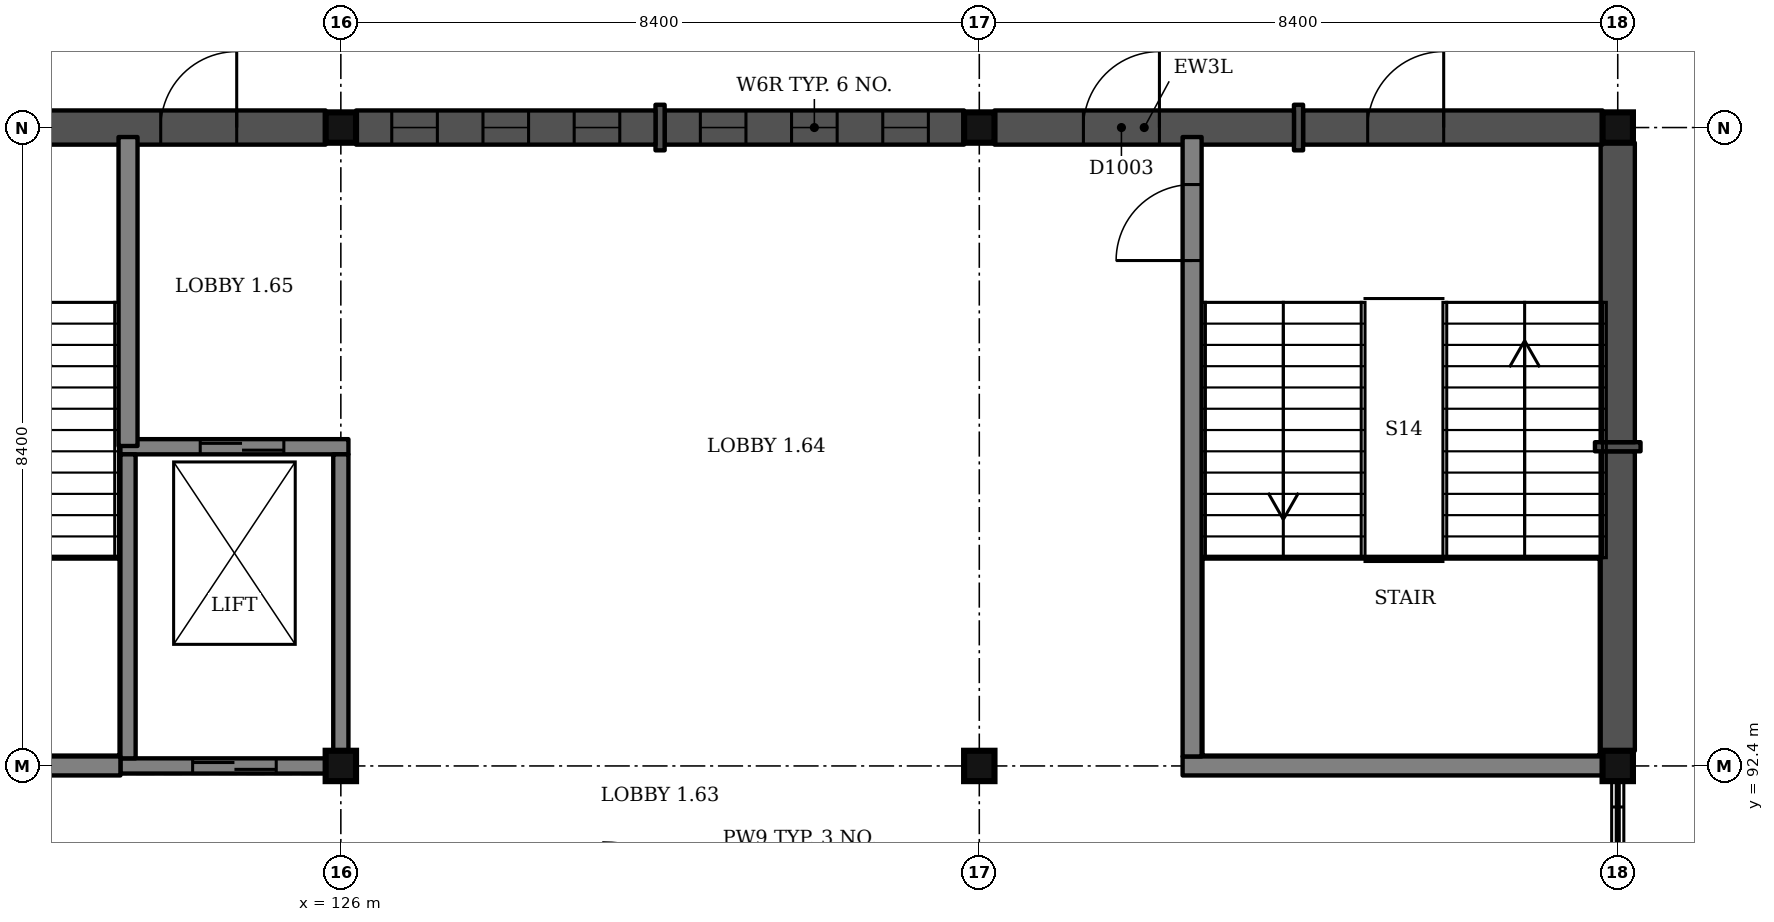
"""IFC4 building model, lengths in metres.
Left out: names, types, materials, properties, quantities, classifications, styles, units other than length and angle.
Written with IfcOpenShell. Run it as: python <this file> out.ifc"""

import sys

from ifc_helpers import new_model, si_unit, direction, frame, frame_2d, origin, origin_2d, place, context, subcontext, project, spatial, rectangle, extrude, element, fill, save


model = new_model("IFC4")
c1 = context("Model", 3, precision=1e-05, world=origin(), true_north=direction((0.0, 1.0)))
c2 = subcontext(c1, "Body", "Model", "MODEL_VIEW")
j1 = project(units=[si_unit("LENGTHUNIT", "METRE"), si_unit("PLANEANGLEUNIT", "RADIAN")], contexts=[c1])
p1 = place(None, origin())
s1 = spatial("IfcSite", under=j1, at=p1, CompositionType="ELEMENT")
p2 = place(p1, origin())
s2 = spatial("IfcBuilding", under=s1, at=p2, CompositionType="ELEMENT")
p3 = place(p2, frame((0.0, 0.0, 4.5)))
s3 = spatial("IfcBuildingStorey", under=s2, at=p3, CompositionType="ELEMENT", Elevation=4.5)
for number, where, z_axis, x_axis in (
    (1, (126.0, 92.4, -1.5), (0.0, 0.0, 1.0), (1.0, 0.0, 0.0)),
    (2, (126.0, 100.8, -1.5), (0.0, 0.0, 1.0), (1.0, 0.0, 0.0)),
    (3, (134.4, 92.4, -1.5), (0.0, 0.0, 1.0), (1.0, 0.0, 0.0)),
    (4, (134.4, 100.8, -1.5), (0.0, 0.0, 1.0), (1.0, 0.0, 0.0)),
    (5, (142.8, 92.4, -1.5), (0.0, 0.0, 1.0), (1.0, 0.0, 0.0)),
    (6, (142.8, 100.8, -1.5), (0.0, 0.0, 1.0), (1.0, 0.0, 0.0)),
):
    element("IfcColumn", number, at=place(p3, frame(where, z_axis=z_axis, x_axis=x_axis)), inside=s3, PredefinedType="COLUMN", context=c2, shape_type="SweptSolid", body=[
        extrude(rectangle(XDim=0.4, YDim=0.4, at=origin_2d()), origin(), (0.0, 0.0, 1.0), 6.0),
    ])
p4 = place(p3, frame((123.1, 92.4, 0.0), z_axis=(0.0, 0.0, 1.0), x_axis=(1.0, 0.0, 0.0)))
e7 = element("IfcWall", 7, at=p4, inside=s3, PredefinedType="SHEAR", context=c2, shape_type="SweptSolid", body=[
    extrude(rectangle(XDim=2.7, YDim=0.2, at=frame_2d((1.35, 0.0))), origin(), (0.0, 0.0, 1.0), 4.5),
])
p5 = place(p4, frame((0.95, 0.0, 0.0)))
e8 = element("IfcOpeningElement", 8, at=p5, cuts=e7, PredefinedType="OPENING", context=c2, shape_type="SweptSolid", body=[
    extrude(rectangle(XDim=1.1, YDim=2.1, at=frame_2d((0.55, 1.05))), frame((0.0, 0.11, 0.0), z_axis=(0.0, -1.0, 0.0), x_axis=(1.0, 0.0, 0.0)), (0.0, 0.0, 1.0), 0.22),
])
p6 = place(p3, frame((123.1, 96.6, 0.0), z_axis=(0.0, 0.0, 1.0), x_axis=(1.0, 0.0, 0.0)))
e9 = element("IfcWall", 9, at=p6, inside=s3, PredefinedType="SHEAR", context=c2, shape_type="SweptSolid", body=[
    extrude(rectangle(XDim=3.0, YDim=0.2, at=frame_2d((1.5, 0.0))), origin(), (0.0, 0.0, 1.0), 4.5),
])
p7 = place(p6, frame((1.05, 0.0, 0.0)))
e10 = element("IfcOpeningElement", 10, at=p7, cuts=e9, PredefinedType="OPENING", context=c2, shape_type="SweptSolid", body=[
    extrude(rectangle(XDim=1.1, YDim=2.1, at=frame_2d((0.55, 1.05))), frame((0.0, 0.11, 0.0), z_axis=(0.0, -1.0, 0.0), x_axis=(1.0, 0.0, 0.0)), (0.0, 0.0, 1.0), 0.22),
])
p8 = place(p3, frame((123.2, 92.5, 0.0), z_axis=(0.0, 0.0, 1.0), x_axis=(0.0, 1.0, 0.0)))
e11 = element("IfcWall", 11, at=p8, inside=s3, PredefinedType="SHEAR", context=c2, shape_type="SweptSolid", body=[
    extrude(rectangle(XDim=4.0, YDim=0.2, at=frame_2d((2.0, 0.0))), origin(), (0.0, 0.0, 1.0), 4.5),
])
p9 = place(p3, frame((126.0, 92.6, 0.0), z_axis=(0.0, 0.0, 1.0), x_axis=(0.0, 1.0, 0.0)))
e12 = element("IfcWall", 12, at=p9, inside=s3, PredefinedType="SHEAR", context=c2, shape_type="SweptSolid", body=[
    extrude(rectangle(XDim=3.9, YDim=0.2, at=frame_2d((1.95, 0.0))), origin(), (0.0, 0.0, 1.0), 4.5),
])
p10 = place(p3, frame((117.8, 92.4, 0.0), z_axis=(0.0, 0.0, 1.0), x_axis=(1.0, 0.0, 0.0)))
e13 = element("IfcWall", 13, at=p10, inside=s3, PredefinedType="SHEAR", context=c2, shape_type="SweptSolid", body=[
    extrude(rectangle(XDim=5.3, YDim=0.25, at=frame_2d((2.65, 0.0))), origin(), (0.0, 0.0, 1.0), 4.5),
])
p11 = place(p3, frame((123.2, 96.61, 0.0), z_axis=(0.0, 0.0, 1.0), x_axis=(0.0, 1.0, 0.0)))
e14 = element("IfcWall", 14, at=p11, inside=s3, PredefinedType="SHEAR", context=c2, shape_type="SweptSolid", body=[
    extrude(rectangle(XDim=4.065, YDim=0.25, at=frame_2d((2.032, 0.0))), origin(), (0.0, 0.0, 1.0), 4.5),
])
p12 = place(p3, frame((137.075, 92.4, 0.0), z_axis=(0.0, 0.0, 1.0), x_axis=(1.0, 0.0, 0.0)))
e15 = element("IfcWall", 15, at=p12, inside=s3, PredefinedType="SHEAR", context=c2, shape_type="SweptSolid", body=[
    extrude(rectangle(XDim=5.525, YDim=0.25, at=frame_2d((2.763, 0.0))), origin(), (0.0, 0.0, 1.0), 4.5),
])
p13 = place(p3, frame((137.2, 92.525, 0.0), z_axis=(0.0, 0.0, 1.0), x_axis=(0.0, 1.0, 0.0)))
e16 = element("IfcWall", 16, at=p13, inside=s3, PredefinedType="SHEAR", context=c2, shape_type="SweptSolid", body=[
    extrude(rectangle(XDim=8.15, YDim=0.25, at=frame_2d((4.075, 0.0))), origin(), (0.0, 0.0, 1.0), 4.5),
])
p14 = place(p13, frame((6.525, 0.0, 0.0)))
e17 = element("IfcOpeningElement", 17, at=p14, cuts=e16, PredefinedType="OPENING", context=c2, shape_type="SweptSolid", body=[
    extrude(rectangle(XDim=1.0, YDim=2.1, at=frame_2d((0.5, 1.05))), frame((0.0, 0.135, 0.0), z_axis=(0.0, -1.0, 0.0), x_axis=(1.0, 0.0, 0.0)), (0.0, 0.0, 1.0), 0.27),
])
p15 = place(p3, frame((142.8, 92.6, 0.0), z_axis=(0.0, 0.0, 1.0), x_axis=(0.0, 1.0, 0.0)))
e18 = element("IfcWall", 18, at=p15, inside=s3, PredefinedType="SOLIDWALL", context=c2, shape_type="SweptSolid", body=[
    extrude(rectangle(XDim=3.94, YDim=0.45, at=frame_2d((1.97, 0.0))), origin(), (0.0, 0.0, 1.0), 3.65),
])
p16 = place(p3, frame((142.8, 96.54, 0.0), z_axis=(0.0, 0.0, 1.0), x_axis=(0.0, 1.0, 0.0)))
e19 = element("IfcWall", 19, at=p16, inside=s3, PredefinedType="SOLIDWALL", context=c2, shape_type="SweptSolid", body=[
    extrude(rectangle(XDim=0.12, YDim=0.6, at=frame_2d((0.06, 0.0))), origin(), (0.0, 0.0, 1.0), 3.65),
])
p17 = place(p3, frame((142.8, 96.66, 0.0), z_axis=(0.0, 0.0, 1.0), x_axis=(0.0, 1.0, 0.0)))
e20 = element("IfcWall", 20, at=p17, inside=s3, PredefinedType="SOLIDWALL", context=c2, shape_type="SweptSolid", body=[
    extrude(rectangle(XDim=3.94, YDim=0.45, at=frame_2d((1.97, 0.0))), origin(), (0.0, 0.0, 1.0), 3.65),
])
p18 = place(p3, frame((142.6, 100.8, 0.0), z_axis=(0.0, 0.0, 1.0), x_axis=(-1.0, 0.0, 0.0)))
e21 = element("IfcWall", 21, at=p18, inside=s3, PredefinedType="SOLIDWALL", context=c2, shape_type="SweptSolid", body=[
    extrude(rectangle(XDim=3.94, YDim=0.45, at=frame_2d((1.97, 0.0))), origin(), (0.0, 0.0, 1.0), 3.35),
])
p19 = place(p18, frame((3.09, 0.0, 0.0), z_axis=(0.0, 0.0, 1.0), x_axis=(-1.0, 0.0, 0.0)))
e22 = element("IfcOpeningElement", 22, at=p19, cuts=e21, PredefinedType="OPENING", context=c2, shape_type="SweptSolid", body=[
    extrude(rectangle(XDim=1.0, YDim=2.1, at=frame_2d((0.5, 1.05))), frame((0.0, 0.235, 0.0), z_axis=(0.0, -1.0, 0.0), x_axis=(1.0, 0.0, 0.0)), (0.0, 0.0, 1.0), 0.47),
])
p20 = place(p3, frame((138.66, 100.8, 0.0), z_axis=(0.0, 0.0, 1.0), x_axis=(-1.0, 0.0, 0.0)))
e23 = element("IfcWall", 23, at=p20, inside=s3, PredefinedType="SOLIDWALL", context=c2, shape_type="SweptSolid", body=[
    extrude(rectangle(XDim=0.12, YDim=0.6, at=frame_2d((0.06, 0.0))), origin(), (0.0, 0.0, 1.0), 3.35),
])
p21 = place(p3, frame((138.54, 100.8, 0.0), z_axis=(0.0, 0.0, 1.0), x_axis=(-1.0, 0.0, 0.0)))
e24 = element("IfcWall", 24, at=p21, inside=s3, PredefinedType="SOLIDWALL", context=c2, shape_type="SweptSolid", body=[
    extrude(rectangle(XDim=3.94, YDim=0.45, at=frame_2d((1.97, 0.0))), origin(), (0.0, 0.0, 1.0), 3.35),
])
p22 = place(p21, frame((1.77, 0.0, 0.0)))
e25 = element("IfcOpeningElement", 25, at=p22, cuts=e24, PredefinedType="OPENING", context=c2, shape_type="SweptSolid", body=[
    extrude(rectangle(XDim=1.0, YDim=2.1, at=frame_2d((0.5, 1.05))), frame((0.0, 0.235, 0.0), z_axis=(0.0, -1.0, 0.0), x_axis=(1.0, 0.0, 0.0)), (0.0, 0.0, 1.0), 0.47),
])
p23 = place(p3, frame((134.2, 100.8, 0.0), z_axis=(0.0, 0.0, 1.0), x_axis=(-1.0, 0.0, 0.0)))
e26 = element("IfcWall", 26, at=p23, inside=s3, PredefinedType="SOLIDWALL", context=c2, shape_type="SweptSolid", body=[
    extrude(rectangle(XDim=3.94, YDim=0.45, at=frame_2d((1.97, 0.0))), origin(), (0.0, 0.0, 1.0), 3.35),
])
p24 = place(p23, frame((0.47, 0.0, 1.0)))
e27 = element("IfcOpeningElement", 27, at=p24, cuts=e26, PredefinedType="OPENING", context=c2, shape_type="SweptSolid", body=[
    extrude(rectangle(XDim=0.6, YDim=1.8, at=frame_2d((0.3, 0.9))), frame((0.0, 0.235, 0.0), z_axis=(0.0, -1.0, 0.0), x_axis=(1.0, 0.0, 0.0)), (0.0, 0.0, 1.0), 0.47),
])
p25 = place(p23, frame((1.67, 0.0, 1.0)))
e28 = element("IfcOpeningElement", 28, at=p25, cuts=e26, PredefinedType="OPENING", context=c2, shape_type="SweptSolid", body=[
    extrude(rectangle(XDim=0.6, YDim=1.8, at=frame_2d((0.3, 0.9))), frame((0.0, 0.235, 0.0), z_axis=(0.0, -1.0, 0.0), x_axis=(1.0, 0.0, 0.0)), (0.0, 0.0, 1.0), 0.47),
])
p26 = place(p23, frame((2.87, 0.0, 1.0)))
e29 = element("IfcOpeningElement", 29, at=p26, cuts=e26, PredefinedType="OPENING", context=c2, shape_type="SweptSolid", body=[
    extrude(rectangle(XDim=0.6, YDim=1.8, at=frame_2d((0.3, 0.9))), frame((0.0, 0.235, 0.0), z_axis=(0.0, -1.0, 0.0), x_axis=(1.0, 0.0, 0.0)), (0.0, 0.0, 1.0), 0.47),
])
p27 = place(p3, frame((130.26, 100.8, 0.0), z_axis=(0.0, 0.0, 1.0), x_axis=(-1.0, 0.0, 0.0)))
e30 = element("IfcWall", 30, at=p27, inside=s3, PredefinedType="SOLIDWALL", context=c2, shape_type="SweptSolid", body=[
    extrude(rectangle(XDim=0.12, YDim=0.6, at=frame_2d((0.06, 0.0))), origin(), (0.0, 0.0, 1.0), 3.35),
])
p28 = place(p3, frame((130.14, 100.8, 0.0), z_axis=(0.0, 0.0, 1.0), x_axis=(-1.0, 0.0, 0.0)))
e31 = element("IfcWall", 31, at=p28, inside=s3, PredefinedType="SOLIDWALL", context=c2, shape_type="SweptSolid", body=[
    extrude(rectangle(XDim=3.94, YDim=0.45, at=frame_2d((1.97, 0.0))), origin(), (0.0, 0.0, 1.0), 3.35),
])
p29 = place(p28, frame((0.47, 0.0, 1.0)))
e32 = element("IfcOpeningElement", 32, at=p29, cuts=e31, PredefinedType="OPENING", context=c2, shape_type="SweptSolid", body=[
    extrude(rectangle(XDim=0.6, YDim=1.8, at=frame_2d((0.3, 0.9))), frame((0.0, 0.235, 0.0), z_axis=(0.0, -1.0, 0.0), x_axis=(1.0, 0.0, 0.0)), (0.0, 0.0, 1.0), 0.47),
])
p30 = place(p28, frame((1.67, 0.0, 1.0)))
e33 = element("IfcOpeningElement", 33, at=p30, cuts=e31, PredefinedType="OPENING", context=c2, shape_type="SweptSolid", body=[
    extrude(rectangle(XDim=0.6, YDim=1.8, at=frame_2d((0.3, 0.9))), frame((0.0, 0.235, 0.0), z_axis=(0.0, -1.0, 0.0), x_axis=(1.0, 0.0, 0.0)), (0.0, 0.0, 1.0), 0.47),
])
p31 = place(p28, frame((2.87, 0.0, 1.0)))
e34 = element("IfcOpeningElement", 34, at=p31, cuts=e31, PredefinedType="OPENING", context=c2, shape_type="SweptSolid", body=[
    extrude(rectangle(XDim=0.6, YDim=1.8, at=frame_2d((0.3, 0.9))), frame((0.0, 0.235, 0.0), z_axis=(0.0, -1.0, 0.0), x_axis=(1.0, 0.0, 0.0)), (0.0, 0.0, 1.0), 0.47),
])
p32 = place(p3, frame((125.8, 100.8, 0.0), z_axis=(0.0, 0.0, 1.0), x_axis=(-1.0, 0.0, 0.0)))
e35 = element("IfcWall", 35, at=p32, inside=s3, PredefinedType="SOLIDWALL", context=c2, shape_type="SweptSolid", body=[
    extrude(rectangle(XDim=3.94, YDim=0.45, at=frame_2d((1.97, 0.0))), origin(), (0.0, 0.0, 1.0), 3.35),
])
p33 = place(p32, frame((1.17, 0.0, 0.0)))
e36 = element("IfcOpeningElement", 36, at=p33, cuts=e35, PredefinedType="OPENING", context=c2, shape_type="SweptSolid", body=[
    extrude(rectangle(XDim=1.0, YDim=2.1, at=frame_2d((0.5, 1.05))), frame((0.0, 0.235, 0.0), z_axis=(0.0, -1.0, 0.0), x_axis=(1.0, 0.0, 0.0)), (0.0, 0.0, 1.0), 0.47),
])
p34 = place(p22, origin())
e37 = element("IfcDoor", 37, at=p34, inside=s3, OperationType="SINGLE_SWING_LEFT", PredefinedType="DOOR", context=c2, shape_type="SweptSolid", body=[
    extrude(rectangle(XDim=1.0, YDim=2.1, at=frame_2d((0.5, 1.05))), frame((0.0, 0.025, 0.0), z_axis=(0.0, -1.0, 0.0), x_axis=(1.0, 0.0, 0.0)), (0.0, 0.0, 1.0), 0.05),
])
fill(e25, e37)
p35 = place(p24, origin())
e38 = element("IfcWindow", 38, at=p35, inside=s3, PartitioningType="SINGLE_PANEL", PredefinedType="WINDOW", context=c2, shape_type="SweptSolid", body=[
    extrude(rectangle(XDim=0.6, YDim=1.8, at=frame_2d((0.3, 0.9))), frame((0.0, 0.135, 0.0), z_axis=(0.0, -1.0, 0.0), x_axis=(1.0, 0.0, 0.0)), (0.0, 0.0, 1.0), 0.06),
])
fill(e27, e38)
p36 = place(p25, origin())
e39 = element("IfcWindow", 39, at=p36, inside=s3, PartitioningType="SINGLE_PANEL", PredefinedType="WINDOW", context=c2, shape_type="SweptSolid", body=[
    extrude(rectangle(XDim=0.6, YDim=1.8, at=frame_2d((0.3, 0.9))), frame((0.0, 0.135, 0.0), z_axis=(0.0, -1.0, 0.0), x_axis=(1.0, 0.0, 0.0)), (0.0, 0.0, 1.0), 0.06),
])
fill(e28, e39)
p37 = place(p26, origin())
e40 = element("IfcWindow", 40, at=p37, inside=s3, PartitioningType="SINGLE_PANEL", PredefinedType="WINDOW", context=c2, shape_type="SweptSolid", body=[
    extrude(rectangle(XDim=0.6, YDim=1.8, at=frame_2d((0.3, 0.9))), frame((0.0, 0.135, 0.0), z_axis=(0.0, -1.0, 0.0), x_axis=(1.0, 0.0, 0.0)), (0.0, 0.0, 1.0), 0.06),
])
fill(e29, e40)
p38 = place(p29, origin())
e41 = element("IfcWindow", 41, at=p38, inside=s3, PartitioningType="SINGLE_PANEL", PredefinedType="WINDOW", context=c2, shape_type="SweptSolid", body=[
    extrude(rectangle(XDim=0.6, YDim=1.8, at=frame_2d((0.3, 0.9))), frame((0.0, 0.135, 0.0), z_axis=(0.0, -1.0, 0.0), x_axis=(1.0, 0.0, 0.0)), (0.0, 0.0, 1.0), 0.06),
])
fill(e32, e41)
p39 = place(p30, origin())
e42 = element("IfcWindow", 42, at=p39, inside=s3, PartitioningType="SINGLE_PANEL", PredefinedType="WINDOW", context=c2, shape_type="SweptSolid", body=[
    extrude(rectangle(XDim=0.6, YDim=1.8, at=frame_2d((0.3, 0.9))), frame((0.0, 0.135, 0.0), z_axis=(0.0, -1.0, 0.0), x_axis=(1.0, 0.0, 0.0)), (0.0, 0.0, 1.0), 0.06),
])
fill(e33, e42)
p40 = place(p31, origin())
e43 = element("IfcWindow", 43, at=p40, inside=s3, PartitioningType="SINGLE_PANEL", PredefinedType="WINDOW", context=c2, shape_type="SweptSolid", body=[
    extrude(rectangle(XDim=0.6, YDim=1.8, at=frame_2d((0.3, 0.9))), frame((0.0, 0.135, 0.0), z_axis=(0.0, -1.0, 0.0), x_axis=(1.0, 0.0, 0.0)), (0.0, 0.0, 1.0), 0.06),
])
fill(e34, e43)
p41 = place(p33, origin())
e44 = element("IfcDoor", 44, at=p41, inside=s3, OperationType="SINGLE_SWING_LEFT", PredefinedType="DOOR", context=c2, shape_type="SweptSolid", body=[
    extrude(rectangle(XDim=1.0, YDim=2.1, at=frame_2d((0.5, 1.05))), frame((0.0, 0.025, 0.0), z_axis=(0.0, -1.0, 0.0), x_axis=(1.0, 0.0, 0.0)), (0.0, 0.0, 1.0), 0.05),
])
fill(e36, e44)
p42 = place(p14, origin())
e45 = element("IfcDoor", 45, at=p42, inside=s3, OperationType="SINGLE_SWING_LEFT", PredefinedType="DOOR", context=c2, shape_type="SweptSolid", body=[
    extrude(rectangle(XDim=1.0, YDim=2.1, at=frame_2d((0.5, 1.05))), frame((0.0, 0.025, 0.0), z_axis=(0.0, -1.0, 0.0), x_axis=(1.0, 0.0, 0.0)), (0.0, 0.0, 1.0), 0.05),
])
fill(e17, e45)
p43 = place(p19, origin())
e46 = element("IfcDoor", 46, at=p43, inside=s3, OperationType="SINGLE_SWING_LEFT", PredefinedType="DOOR", context=c2, shape_type="SweptSolid", body=[
    extrude(rectangle(XDim=1.0, YDim=2.1, at=frame_2d((0.5, 1.05))), frame((0.0, 0.025, 0.0), z_axis=(0.0, -1.0, 0.0), x_axis=(1.0, 0.0, 0.0)), (0.0, 0.0, 1.0), 0.05),
])
fill(e22, e46)
p44 = place(p5, origin())
e47 = element("IfcDoor", 47, at=p44, inside=s3, OperationType="SLIDING_TO_RIGHT", PredefinedType="DOOR", context=c2, shape_type="SweptSolid", body=[
    extrude(rectangle(XDim=1.1, YDim=2.1, at=frame_2d((0.55, 1.05))), frame((0.0, 0.025, 0.0), z_axis=(0.0, -1.0, 0.0), x_axis=(1.0, 0.0, 0.0)), (0.0, 0.0, 1.0), 0.05),
])
fill(e8, e47)
p45 = place(p7, origin())
e48 = element("IfcDoor", 48, at=p45, inside=s3, OperationType="SLIDING_TO_LEFT", PredefinedType="DOOR", context=c2, shape_type="SweptSolid", body=[
    extrude(rectangle(XDim=1.1, YDim=2.1, at=frame_2d((0.55, 1.05))), frame((0.0, 0.025, 0.0), z_axis=(0.0, -1.0, 0.0), x_axis=(1.0, 0.0, 0.0)), (0.0, 0.0, 1.0), 0.05),
])
fill(e10, e48)
save(model, sys.argv[1])
